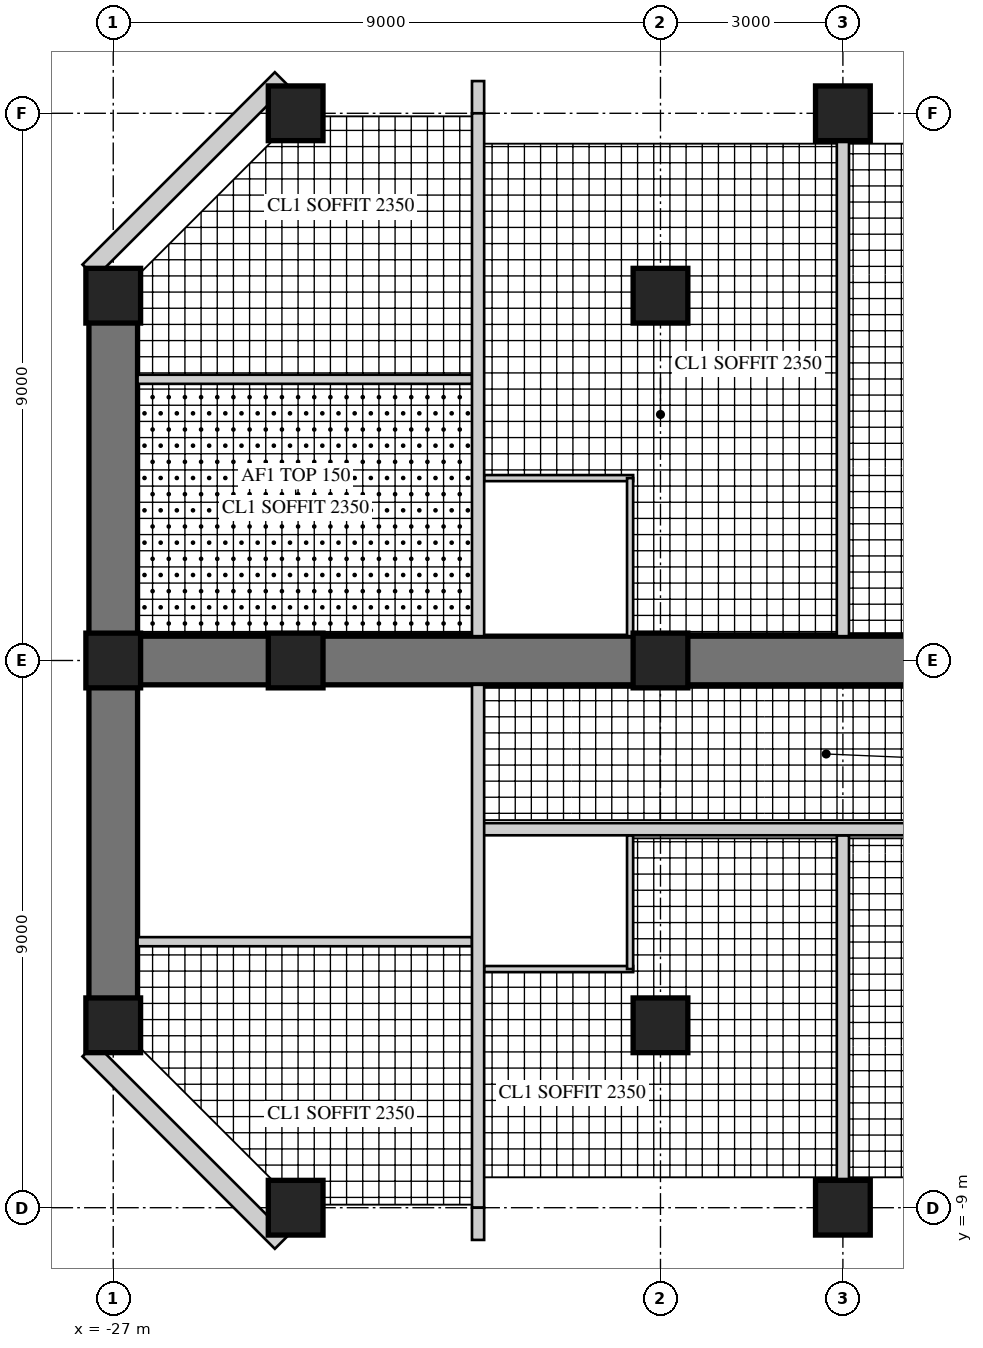
"""IFC4 building model, lengths in metres.
Left out: names, types, materials, properties, quantities, classifications, styles, units other than length and angle.
Written with IfcOpenShell. Run it as: python <this file> out.ifc"""

import sys

from ifc_helpers import new_model, si_unit, direction, frame, frame_2d, origin, origin_2d, place, context, subcontext, project, spatial, rectangle, hollow_rectangle, extrude, element, fill, save


model = new_model("IFC4")
c1 = context("Model", 3, precision=1e-05, world=origin(), true_north=direction((0.0, 1.0)))
c2 = subcontext(c1, "Body", "Model", "MODEL_VIEW")
j1 = project(units=[si_unit("LENGTHUNIT", "METRE"), si_unit("PLANEANGLEUNIT", "RADIAN")], contexts=[c1])
p1 = place(None, origin())
s1 = spatial("IfcSite", under=j1, at=p1, CompositionType="ELEMENT")
p2 = place(p1, origin())
s2 = spatial("IfcBuilding", under=s1, at=p2, CompositionType="ELEMENT")
p3 = place(p2, frame((0.0, 0.0, 189.9)))
s3 = spatial("IfcBuildingStorey", under=s2, at=p3, CompositionType="ELEMENT", Elevation=189.9)
p4 = place(p3, frame((-9.0, 0.0, 0.0), z_axis=(0.0, 0.0, 1.0), x_axis=(-1.0, 0.0, 0.0)))
e1 = element("IfcWall", 1, at=p4, inside=s3, PredefinedType="SHEAR", context=c2, shape_type="SweptSolid", body=[
    extrude(rectangle(XDim=18.0, YDim=0.8, at=frame_2d((9.0, 0.0))), origin(), (0.0, 0.0, 1.0), 3.4),
])
p5 = place(p4, frame((3.95, 0.0, 0.0)))
e2 = element("IfcOpeningElement", 2, at=p5, cuts=e1, PredefinedType="OPENING", context=c2, shape_type="SweptSolid", body=[
    extrude(rectangle(XDim=1.0, YDim=2.15, at=frame_2d((0.5, 1.075))), frame((0.0, 0.41, 0.0), z_axis=(0.0, -1.0, 0.0), x_axis=(1.0, 0.0, 0.0)), (0.0, 0.0, 1.0), 0.82),
])
p6 = place(p4, frame((6.6, 0.0, 0.0)))
e3 = element("IfcOpeningElement", 3, at=p6, cuts=e1, PredefinedType="OPENING", context=c2, shape_type="SweptSolid", body=[
    extrude(rectangle(XDim=1.0, YDim=2.15, at=frame_2d((0.5, 1.075))), frame((0.0, 0.41, 0.0), z_axis=(0.0, -1.0, 0.0), x_axis=(1.0, 0.0, 0.0)), (0.0, 0.0, 1.0), 0.82),
])
p7 = place(p4, frame((13.25, 0.0, 0.0)))
e4 = element("IfcOpeningElement", 4, at=p7, cuts=e1, PredefinedType="OPENING", context=c2, shape_type="SweptSolid", body=[
    extrude(rectangle(XDim=1.0, YDim=2.2, at=frame_2d((0.5, 1.1))), frame((0.0, 0.41, 0.0), z_axis=(0.0, -1.0, 0.0), x_axis=(1.0, 0.0, 0.0)), (0.0, 0.0, 1.0), 0.82),
])
p8 = place(p3, frame((-27.0, 6.0, 0.0), z_axis=(0.0, 0.0, 1.0), x_axis=(0.0, -1.0, 0.0)))
e5 = element("IfcWall", 5, at=p8, inside=s3, PredefinedType="SHEAR", context=c2, shape_type="SweptSolid", body=[
    extrude(rectangle(XDim=12.0, YDim=0.8, at=frame_2d((6.0, 0.0))), origin(), (0.0, 0.0, 1.0), 3.4),
])
p9 = place(p8, frame((1.625, 0.0, 0.6)))
e6 = element("IfcOpeningElement", 6, at=p9, cuts=e5, PredefinedType="OPENING", context=c2, shape_type="SweptSolid", body=[
    extrude(rectangle(XDim=3.0, YDim=2.4, at=frame_2d((1.5, 1.2))), frame((0.0, 0.41, 0.0), z_axis=(0.0, -1.0, 0.0), x_axis=(1.0, 0.0, 0.0)), (0.0, 0.0, 1.0), 0.82),
])
p10 = place(p8, frame((7.375, 0.0, 0.6)))
e7 = element("IfcOpeningElement", 7, at=p10, cuts=e5, PredefinedType="OPENING", context=c2, shape_type="SweptSolid", body=[
    extrude(rectangle(XDim=3.0, YDim=2.4, at=frame_2d((1.5, 1.2))), frame((0.0, 0.41, 0.0), z_axis=(0.0, -1.0, 0.0), x_axis=(1.0, 0.0, 0.0)), (0.0, 0.0, 1.0), 0.82),
])
for number, where, z_axis, x_axis in (
    (8, (-15.0, 9.0, 0.0), (0.0, 0.0, 1.0), (1.0, 0.0, 0.0)),
    (9, (-24.0, 9.0, 0.0), (0.0, 0.0, 1.0), (1.0, 0.0, 0.0)),
    (10, (-15.0, -9.0, 0.0), (0.0, 0.0, 1.0), (1.0, 0.0, 0.0)),
    (11, (-24.0, -9.0, 0.0), (0.0, 0.0, 1.0), (1.0, 0.0, 0.0)),
    (12, (-27.0, 6.0, 0.0), (0.0, 0.0, 1.0), (1.0, 0.0, 0.0)),
    (13, (-27.0, 0.0, 0.0), (0.0, 0.0, 1.0), (1.0, 0.0, 0.0)),
    (14, (-27.0, -6.0, 0.0), (0.0, 0.0, 1.0), (1.0, 0.0, 0.0)),
    (15, (-18.0, 6.0, 0.0), (0.0, 0.0, 1.0), (1.0, 0.0, 0.0)),
    (16, (-18.0, 0.0, 0.0), (0.0, 0.0, 1.0), (1.0, 0.0, 0.0)),
    (17, (-18.0, -6.0, 0.0), (0.0, 0.0, 1.0), (1.0, 0.0, 0.0)),
    (18, (-24.0, 0.0, 0.0), (0.0, 0.0, 1.0), (1.0, 0.0, 0.0)),
):
    element("IfcColumn", number, at=place(p3, frame(where, z_axis=z_axis, x_axis=x_axis)), inside=s3, PredefinedType="COLUMN", context=c2, shape_type="SweptSolid", body=[
        extrude(rectangle(XDim=0.9, YDim=0.9, at=origin_2d()), origin(), (0.0, 0.0, 1.0), 3.4),
    ])
p11 = place(p3, frame((-24.236, 9.57, 0.0), z_axis=(0.0, 0.0, 1.0), x_axis=(-0.707079499254, -0.707134062067, 0.0)))
e19 = element("IfcWall", 19, at=p11, inside=s3, PredefinedType="SOLIDWALL", context=c2, shape_type="SweptSolid", body=[
    extrude(rectangle(XDim=4.475, YDim=0.3, at=frame_2d((2.237, 0.0))), origin(), (0.0, 0.0, 1.0), 3.22),
])
p12 = place(p11, frame((1.787, 0.0, 0.3)))
e20 = element("IfcOpeningElement", 20, at=p12, cuts=e19, PredefinedType="OPENING", context=c2, shape_type="SweptSolid", body=[
    extrude(rectangle(XDim=0.9, YDim=2.4, at=frame_2d((0.45, 1.2))), frame((0.0, 0.16, 0.0), z_axis=(0.0, -1.0, 0.0), x_axis=(1.0, 0.0, 0.0)), (0.0, 0.0, 1.0), 0.32),
])
p13 = place(p3, frame((-27.4, -6.406, 0.0), z_axis=(0.0, 0.0, 1.0), x_axis=(0.707079499254, -0.707134062067, 0.0)))
e21 = element("IfcWall", 21, at=p13, inside=s3, PredefinedType="SOLIDWALL", context=c2, shape_type="SweptSolid", body=[
    extrude(rectangle(XDim=4.475, YDim=0.3, at=frame_2d((2.237, 0.0))), origin(), (0.0, 0.0, 1.0), 3.22),
])
p14 = place(p13, frame((1.787, 0.0, 0.3)))
e22 = element("IfcOpeningElement", 22, at=p14, cuts=e21, PredefinedType="OPENING", context=c2, shape_type="SweptSolid", body=[
    extrude(rectangle(XDim=0.9, YDim=2.4, at=frame_2d((0.45, 1.2))), frame((0.0, 0.16, 0.0), z_axis=(0.0, -1.0, 0.0), x_axis=(1.0, 0.0, 0.0)), (0.0, 0.0, 1.0), 0.32),
])
p15 = place(p3, frame((-15.0, -2.875, 0.0), z_axis=(0.0, 0.0, 1.0), x_axis=(0.0, -1.0, 0.0)))
e23 = element("IfcWall", 23, at=p15, inside=s3, PredefinedType="SOLIDWALL", context=c2, shape_type="SweptSolid", body=[
    extrude(rectangle(XDim=5.675, YDim=0.2, at=frame_2d((2.837, 0.0))), origin(), (0.0, 0.0, 1.0), 2.47),
])
p16 = place(p3, frame((-15.0, 8.55, 0.0), z_axis=(0.0, 0.0, 1.0), x_axis=(0.0, -1.0, 0.0)))
e24 = element("IfcWall", 24, at=p16, inside=s3, PredefinedType="SOLIDWALL", context=c2, shape_type="SweptSolid", body=[
    extrude(rectangle(XDim=8.15, YDim=0.2, at=frame_2d((4.075, 0.0))), origin(), (0.0, 0.0, 1.0), 2.47),
])
p17 = place(p3, frame((-18.45, -5.075, 0.0), z_axis=(0.0, 0.0, 1.0), x_axis=(-1.0, 0.0, 0.0)))
e25 = element("IfcWall", 25, at=p17, inside=s3, PredefinedType="PARTITIONING", context=c2, shape_type="SweptSolid", body=[
    extrude(rectangle(XDim=2.45, YDim=0.1, at=frame_2d((1.225, 0.0))), origin(), (0.0, 0.0, 1.0), 3.22),
])
p18 = place(p3, frame((-18.5, -2.875, 0.0), z_axis=(0.0, 0.0, 1.0), x_axis=(0.0, -1.0, 0.0)))
e26 = element("IfcWall", 26, at=p18, inside=s3, PredefinedType="PARTITIONING", context=c2, shape_type="SweptSolid", body=[
    extrude(rectangle(XDim=2.2, YDim=0.1, at=frame_2d((1.1, 0.0))), origin(), (0.0, 0.0, 1.0), 3.22),
])
p19 = place(p18, frame((0.55, 0.0, 0.0)))
e27 = element("IfcOpeningElement", 27, at=p19, cuts=e26, PredefinedType="OPENING", context=c2, shape_type="SweptSolid", body=[
    extrude(rectangle(XDim=0.9, YDim=2.1, at=frame_2d((0.45, 1.05))), frame((0.0, 0.06, 0.0), z_axis=(0.0, -1.0, 0.0), x_axis=(1.0, 0.0, 0.0)), (0.0, 0.0, 1.0), 0.12),
])
p20 = place(p3, frame((-18.45, 3.0, 0.0), z_axis=(0.0, 0.0, 1.0), x_axis=(-1.0, 0.0, 0.0)))
e28 = element("IfcWall", 28, at=p20, inside=s3, PredefinedType="PARTITIONING", context=c2, shape_type="SweptSolid", body=[
    extrude(rectangle(XDim=2.45, YDim=0.1, at=frame_2d((1.225, 0.0))), origin(), (0.0, 0.0, 1.0), 3.22),
])
p21 = place(p3, frame((-18.5, 3.0, 0.0), z_axis=(0.0, 0.0, 1.0), x_axis=(0.0, -1.0, 0.0)))
e29 = element("IfcWall", 29, at=p21, inside=s3, PredefinedType="PARTITIONING", context=c2, shape_type="SweptSolid", body=[
    extrude(rectangle(XDim=2.6, YDim=0.1, at=frame_2d((1.3, 0.0))), origin(), (0.0, 0.0, 1.0), 3.22),
])
p22 = place(p21, frame((0.55, 0.0, 0.0)))
e30 = element("IfcOpeningElement", 30, at=p22, cuts=e29, PredefinedType="OPENING", context=c2, shape_type="SweptSolid", body=[
    extrude(rectangle(XDim=0.9, YDim=2.1, at=frame_2d((0.45, 1.05))), frame((0.0, 0.06, 0.0), z_axis=(0.0, -1.0, 0.0), x_axis=(1.0, 0.0, 0.0)), (0.0, 0.0, 1.0), 0.12),
])
p23 = place(p3, frame((-9.55, -2.775, 0.0), z_axis=(0.0, 0.0, 1.0), x_axis=(-1.0, 0.0, 0.0)))
e31 = element("IfcWall", 31, at=p23, inside=s3, PredefinedType="SOLIDWALL", context=c2, shape_type="SweptSolid", body=[
    extrude(rectangle(XDim=11.45, YDim=0.2, at=frame_2d((5.725, 0.0))), origin(), (0.0, 0.0, 1.0), 3.22),
])
p24 = place(p23, frame((3.4, 0.0, 0.0)))
e32 = element("IfcOpeningElement", 32, at=p24, cuts=e31, PredefinedType="OPENING", context=c2, shape_type="SweptSolid", body=[
    extrude(rectangle(XDim=1.0, YDim=2.15, at=frame_2d((0.5, 1.075))), frame((0.0, 0.11, 0.0), z_axis=(0.0, -1.0, 0.0), x_axis=(1.0, 0.0, 0.0)), (0.0, 0.0, 1.0), 0.22),
])
p25 = place(p23, frame((6.05, 0.0, 0.0)))
e33 = element("IfcOpeningElement", 33, at=p25, cuts=e31, PredefinedType="OPENING", context=c2, shape_type="SweptSolid", body=[
    extrude(rectangle(XDim=1.0, YDim=2.15, at=frame_2d((0.5, 1.075))), frame((0.0, 0.11, 0.0), z_axis=(0.0, -1.0, 0.0), x_axis=(1.0, 0.0, 0.0)), (0.0, 0.0, 1.0), 0.22),
])
p26 = place(p3, frame((-21.1, -4.625, 0.0), z_axis=(0.0, 0.0, 1.0), x_axis=(-1.0, 0.0, 0.0)))
e34 = element("IfcWall", 34, at=p26, inside=s3, PredefinedType="PARTITIONING", context=c2, shape_type="SweptSolid", body=[
    extrude(rectangle(XDim=5.5, YDim=0.15, at=frame_2d((2.75, 0.0))), origin(), (0.0, 0.0, 1.0), 3.22),
])
p27 = place(p26, frame((0.6, 0.0, 0.0)))
e35 = element("IfcOpeningElement", 35, at=p27, cuts=e34, PredefinedType="OPENING", context=c2, shape_type="SweptSolid", body=[
    extrude(rectangle(XDim=1.0, YDim=2.1, at=frame_2d((0.5, 1.05))), frame((0.0, 0.085, 0.0), z_axis=(0.0, -1.0, 0.0), x_axis=(1.0, 0.0, 0.0)), (0.0, 0.0, 1.0), 0.17),
])
p28 = place(p3, frame((-21.1, 4.625, 0.0), z_axis=(0.0, 0.0, 1.0), x_axis=(-1.0, 0.0, 0.0)))
e36 = element("IfcWall", 36, at=p28, inside=s3, PredefinedType="PARTITIONING", context=c2, shape_type="SweptSolid", body=[
    extrude(rectangle(XDim=5.5, YDim=0.15, at=frame_2d((2.75, 0.0))), origin(), (0.0, 0.0, 1.0), 3.22),
])
p29 = place(p28, frame((0.6, 0.0, 0.0)))
e37 = element("IfcOpeningElement", 37, at=p29, cuts=e36, PredefinedType="OPENING", context=c2, shape_type="SweptSolid", body=[
    extrude(rectangle(XDim=1.0, YDim=2.1, at=frame_2d((0.5, 1.05))), frame((0.0, 0.085, 0.0), z_axis=(0.0, -1.0, 0.0), x_axis=(1.0, 0.0, 0.0)), (0.0, 0.0, 1.0), 0.17),
])
p30 = place(p3, frame((-21.0, 9.53, 0.0), z_axis=(0.0, 0.0, 1.0), x_axis=(0.0, -1.0, 0.0)))
e38 = element("IfcWall", 38, at=p30, inside=s3, PredefinedType="SOLIDWALL", context=c2, shape_type="SweptSolid", body=[
    extrude(rectangle(XDim=0.53, YDim=0.2, at=frame_2d((0.265, 0.0))), origin(), (0.0, 0.0, 1.0), 3.22),
])
p31 = place(p3, frame((-21.0, 9.0, 0.0), z_axis=(0.0, 0.0, 1.0), x_axis=(0.0, -1.0, 0.0)))
e39 = element("IfcWall", 39, at=p31, inside=s3, PredefinedType="SOLIDWALL", context=c2, shape_type="SweptSolid", body=[
    extrude(rectangle(XDim=8.6, YDim=0.2, at=frame_2d((4.3, 0.0))), origin(), (0.0, 0.0, 1.0), 2.62),
])
p32 = place(p3, frame((-21.0, -0.4, 0.0), z_axis=(0.0, 0.0, 1.0), x_axis=(0.0, -1.0, 0.0)))
e40 = element("IfcWall", 40, at=p32, inside=s3, PredefinedType="SOLIDWALL", context=c2, shape_type="SweptSolid", body=[
    extrude(rectangle(XDim=8.6, YDim=0.2, at=frame_2d((4.3, 0.0))), origin(), (0.0, 0.0, 1.0), 2.62),
])
p33 = place(p32, frame((0.4, 0.0, 0.0)))
e41 = element("IfcOpeningElement", 41, at=p33, cuts=e40, PredefinedType="OPENING", context=c2, shape_type="SweptSolid", body=[
    extrude(rectangle(XDim=1.0, YDim=2.2, at=frame_2d((0.5, 1.1))), frame((0.0, 0.11, 0.0), z_axis=(0.0, -1.0, 0.0), x_axis=(1.0, 0.0, 0.0)), (0.0, 0.0, 1.0), 0.22),
])
p34 = place(p3, frame((-21.0, -9.0, 0.0), z_axis=(0.0, 0.0, 1.0), x_axis=(0.0, -1.0, 0.0)))
e42 = element("IfcWall", 42, at=p34, inside=s3, PredefinedType="SOLIDWALL", context=c2, shape_type="SweptSolid", body=[
    extrude(rectangle(XDim=0.53, YDim=0.2, at=frame_2d((0.265, 0.0))), origin(), (0.0, 0.0, 1.0), 3.22),
])
p35 = place(p12, origin())
e43 = element("IfcWindow", 43, at=p35, inside=s3, PartitioningType="SINGLE_PANEL", PredefinedType="WINDOW", context=c2, shape_type="SweptSolid", body=[
    extrude(hollow_rectangle(XDim=0.9, YDim=2.4, WallThickness=0.06, at=frame_2d((0.45, 1.2))), frame((0.0, 0.03, 0.0), z_axis=(0.0, -1.0, 0.0), x_axis=(1.0, 0.0, 0.0)), (0.0, 0.0, 1.0), 0.06),
    extrude(rectangle(XDim=0.779, YDim=2.279, at=frame_2d((0.45, 1.2))), frame((0.0, 0.03, 0.0), z_axis=(0.0, -1.0, 0.0), x_axis=(1.0, 0.0, 0.0)), (0.0, 0.0, 1.0), 0.06),
])
fill(e20, e43)
p36 = place(p9, origin())
e44 = element("IfcWindow", 44, at=p36, inside=s3, PartitioningType="SINGLE_PANEL", PredefinedType="WINDOW", context=c2, shape_type="SweptSolid", body=[
    extrude(hollow_rectangle(XDim=3.0, YDim=2.4, WallThickness=0.06, at=frame_2d((1.5, 1.2))), frame((0.0, 0.03, 0.0), z_axis=(0.0, -1.0, 0.0), x_axis=(1.0, 0.0, 0.0)), (0.0, 0.0, 1.0), 0.06),
    extrude(rectangle(XDim=2.879, YDim=2.279, at=frame_2d((1.5, 1.2))), frame((0.0, 0.03, 0.0), z_axis=(0.0, -1.0, 0.0), x_axis=(1.0, 0.0, 0.0)), (0.0, 0.0, 1.0), 0.06),
])
fill(e6, e44)
p37 = place(p10, origin())
e45 = element("IfcWindow", 45, at=p37, inside=s3, PartitioningType="SINGLE_PANEL", PredefinedType="WINDOW", context=c2, shape_type="SweptSolid", body=[
    extrude(hollow_rectangle(XDim=3.0, YDim=2.4, WallThickness=0.06, at=frame_2d((1.5, 1.2))), frame((0.0, 0.03, 0.0), z_axis=(0.0, -1.0, 0.0), x_axis=(1.0, 0.0, 0.0)), (0.0, 0.0, 1.0), 0.06),
    extrude(rectangle(XDim=2.879, YDim=2.279, at=frame_2d((1.5, 1.2))), frame((0.0, 0.03, 0.0), z_axis=(0.0, -1.0, 0.0), x_axis=(1.0, 0.0, 0.0)), (0.0, 0.0, 1.0), 0.06),
])
fill(e7, e45)
p38 = place(p14, origin())
e46 = element("IfcWindow", 46, at=p38, inside=s3, PartitioningType="SINGLE_PANEL", PredefinedType="WINDOW", context=c2, shape_type="SweptSolid", body=[
    extrude(hollow_rectangle(XDim=0.9, YDim=2.4, WallThickness=0.06, at=frame_2d((0.45, 1.2))), frame((0.0, 0.03, 0.0), z_axis=(0.0, -1.0, 0.0), x_axis=(1.0, 0.0, 0.0)), (0.0, 0.0, 1.0), 0.06),
    extrude(rectangle(XDim=0.779, YDim=2.279, at=frame_2d((0.45, 1.2))), frame((0.0, 0.03, 0.0), z_axis=(0.0, -1.0, 0.0), x_axis=(1.0, 0.0, 0.0)), (0.0, 0.0, 1.0), 0.06),
])
fill(e22, e46)
p39 = place(p19, frame((0.9, 0.0, 0.0), z_axis=(0.0, 0.0, 1.0), x_axis=(-1.0, 0.0, 0.0)))
e47 = element("IfcDoor", 47, at=p39, inside=s3, OperationType="SINGLE_SWING_RIGHT", PredefinedType="DOOR", context=c2, shape_type="SweptSolid", body=[
    extrude(rectangle(XDim=0.9, YDim=2.1, at=frame_2d((0.45, 1.05))), frame((0.0, 0.025, 0.0), z_axis=(0.0, -1.0, 0.0), x_axis=(1.0, 0.0, 0.0)), (0.0, 0.0, 1.0), 0.05),
])
fill(e27, e47)
p40 = place(p22, frame((0.9, 0.0, 0.0), z_axis=(0.0, 0.0, 1.0), x_axis=(-1.0, 0.0, 0.0)))
e48 = element("IfcDoor", 48, at=p40, inside=s3, OperationType="SINGLE_SWING_RIGHT", PredefinedType="DOOR", context=c2, shape_type="SweptSolid", body=[
    extrude(rectangle(XDim=0.9, YDim=2.1, at=frame_2d((0.45, 1.05))), frame((0.0, 0.025, 0.0), z_axis=(0.0, -1.0, 0.0), x_axis=(1.0, 0.0, 0.0)), (0.0, 0.0, 1.0), 0.05),
])
fill(e30, e48)
p41 = place(p25, origin())
e49 = element("IfcDoor", 49, at=p41, inside=s3, OperationType="SINGLE_SWING_LEFT", PredefinedType="DOOR", context=c2, shape_type="SweptSolid", body=[
    extrude(rectangle(XDim=1.0, YDim=2.15, at=frame_2d((0.5, 1.075))), frame((0.0, 0.025, 0.0), z_axis=(0.0, -1.0, 0.0), x_axis=(1.0, 0.0, 0.0)), (0.0, 0.0, 1.0), 0.05),
])
fill(e33, e49)
p42 = place(p27, origin())
e50 = element("IfcDoor", 50, at=p42, inside=s3, OperationType="SINGLE_SWING_LEFT", PredefinedType="DOOR", context=c2, shape_type="SweptSolid", body=[
    extrude(rectangle(XDim=1.0, YDim=2.1, at=frame_2d((0.5, 1.05))), frame((0.0, 0.025, 0.0), z_axis=(0.0, -1.0, 0.0), x_axis=(1.0, 0.0, 0.0)), (0.0, 0.0, 1.0), 0.05),
])
fill(e35, e50)
p43 = place(p29, frame((1.0, 0.0, 0.0), z_axis=(0.0, 0.0, 1.0), x_axis=(-1.0, 0.0, 0.0)))
e51 = element("IfcDoor", 51, at=p43, inside=s3, OperationType="SINGLE_SWING_RIGHT", PredefinedType="DOOR", context=c2, shape_type="SweptSolid", body=[
    extrude(rectangle(XDim=1.0, YDim=2.1, at=frame_2d((0.5, 1.05))), frame((0.0, 0.025, 0.0), z_axis=(0.0, -1.0, 0.0), x_axis=(1.0, 0.0, 0.0)), (0.0, 0.0, 1.0), 0.05),
])
fill(e37, e51)
p44 = place(p33, frame((1.0, 0.0, 0.0), z_axis=(0.0, 0.0, 1.0), x_axis=(-1.0, 0.0, 0.0)))
e52 = element("IfcDoor", 52, at=p44, inside=s3, OperationType="SINGLE_SWING_RIGHT", PredefinedType="DOOR", context=c2, shape_type="SweptSolid", body=[
    extrude(rectangle(XDim=1.0, YDim=2.2, at=frame_2d((0.5, 1.1))), frame((0.0, 0.025, 0.0), z_axis=(0.0, -1.0, 0.0), x_axis=(1.0, 0.0, 0.0)), (0.0, 0.0, 1.0), 0.05),
])
fill(e41, e52)
p45 = place(p6, frame((1.0, 0.0, 0.0), z_axis=(0.0, 0.0, 1.0), x_axis=(-1.0, 0.0, 0.0)))
e53 = element("IfcDoor", 53, at=p45, inside=s3, OperationType="SINGLE_SWING_RIGHT", PredefinedType="DOOR", context=c2, shape_type="SweptSolid", body=[
    extrude(rectangle(XDim=1.0, YDim=2.15, at=frame_2d((0.5, 1.075))), frame((0.0, 0.025, 0.0), z_axis=(0.0, -1.0, 0.0), x_axis=(1.0, 0.0, 0.0)), (0.0, 0.0, 1.0), 0.05),
])
fill(e3, e53)
p46 = place(p7, origin())
e54 = element("IfcDoor", 54, at=p46, inside=s3, OperationType="SINGLE_SWING_LEFT", PredefinedType="DOOR", context=c2, shape_type="SweptSolid", body=[
    extrude(rectangle(XDim=1.0, YDim=2.2, at=frame_2d((0.5, 1.1))), frame((0.0, 0.025, 0.0), z_axis=(0.0, -1.0, 0.0), x_axis=(1.0, 0.0, 0.0)), (0.0, 0.0, 1.0), 0.05),
])
fill(e4, e54)
save(model, sys.argv[1])
